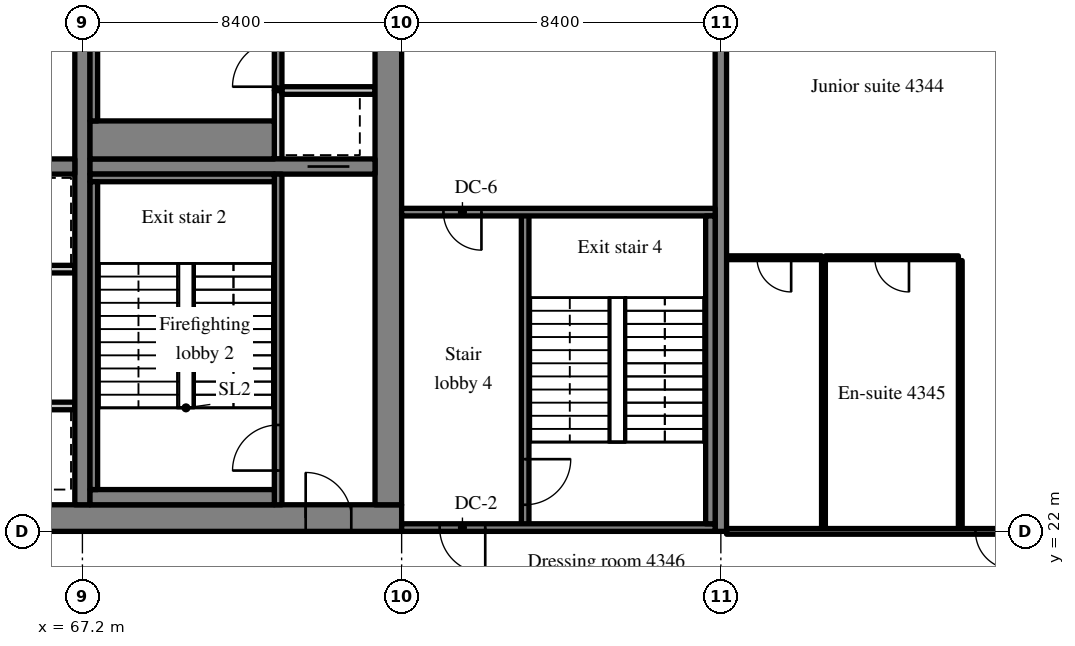
"""IFC4 building model, lengths in metres.
Left out: names, types, materials, properties, quantities, classifications, styles, units other than length and angle.
Written with IfcOpenShell. Run it as: python <this file> out.ifc"""

import sys

from ifc_helpers import new_model, si_unit, direction, frame, frame_2d, origin, place, context, subcontext, project, spatial, rectangle, extrude, source, transform, mapped, element, fill, save


model = new_model("IFC4")
c1 = context("Model", 3, precision=1e-05, world=origin(), true_north=direction((0.0, 1.0)))
c2 = subcontext(c1, "Body", "Model", "MODEL_VIEW")
j1 = project(units=[si_unit("LENGTHUNIT", "METRE"), si_unit("PLANEANGLEUNIT", "RADIAN")], contexts=[c1])
p1 = place(None, origin())
s1 = spatial("IfcSite", under=j1, at=p1, CompositionType="ELEMENT")
p2 = place(p1, origin())
s2 = spatial("IfcBuilding", under=s1, at=p2, CompositionType="ELEMENT")
p3 = place(p2, frame((0.0, 0.0, 178.2)))
s3 = spatial("IfcBuildingStorey", under=s2, at=p3, CompositionType="ELEMENT", Elevation=178.2)
m1 = source(origin(), c2, "Body", "SweptSolid", [
    extrude(rectangle(XDim=50.4, YDim=0.7, at=frame_2d((25.2, 0.0))), origin(), (0.0, 0.0, 1.0), 3.52),
])
p4 = place(p3, frame((25.2, 22.35, 0.0), z_axis=(0.0, 0.0, 1.0), x_axis=(1.0, 0.0, 0.0)))
e1 = element("IfcWall", 1, at=p4, inside=s3, PredefinedType="SHEAR", context=c2, shape_type="MappedRepresentation", body=[
    mapped(m1, transform((0.0, 0.0, 0.0), scale=1.0)),
])
m2 = source(origin(), c2, "Body", "SweptSolid", [
    extrude(rectangle(XDim=1.8, YDim=2.1, at=frame_2d((0.9, 1.05))), frame((0.0, 0.36, 0.0), z_axis=(0.0, -1.0, 0.0), x_axis=(1.0, 0.0, 0.0)), (0.0, 0.0, 1.0), 0.72),
])
p5 = place(p4, frame((15.9, 0.0, 0.0)))
e2 = element("IfcOpeningElement", 2, at=p5, cuts=e1, PredefinedType="OPENING", context=c2, shape_type="MappedRepresentation", body=[
    mapped(m2, transform((0.0, 0.0, 0.0), scale=1.0)),
])
m3 = source(origin(), c2, "Body", "SweptSolid", [
    extrude(rectangle(XDim=0.9, YDim=2.1, at=frame_2d((0.45, 1.05))), frame((0.0, 0.36, 0.0), z_axis=(0.0, -1.0, 0.0), x_axis=(1.0, 0.0, 0.0)), (0.0, 0.0, 1.0), 0.72),
])
p6 = place(p4, frame((11.2, 0.0, 0.0)))
e3 = element("IfcOpeningElement", 3, at=p6, cuts=e1, PredefinedType="OPENING", context=c2, shape_type="MappedRepresentation", body=[
    mapped(m3, transform((0.0, 0.0, 0.0), scale=1.0)),
])
p7 = place(p4, frame((21.5, 0.0, 0.0)))
e4 = element("IfcOpeningElement", 4, at=p7, cuts=e1, PredefinedType="OPENING", context=c2, shape_type="MappedRepresentation", body=[
    mapped(m3, transform((0.0, 0.0, 0.0), scale=1.0)),
])
p8 = place(p4, frame((32.7, 0.0, 0.0)))
e5 = element("IfcOpeningElement", 5, at=p8, cuts=e1, PredefinedType="OPENING", context=c2, shape_type="MappedRepresentation", body=[
    mapped(m2, transform((0.0, 0.0, 0.0), scale=1.0)),
])
m4 = source(origin(), c2, "Body", "SweptSolid", [
    extrude(rectangle(XDim=1.2, YDim=2.1, at=frame_2d((0.6, 1.05))), frame((0.0, 0.36, 0.0), z_axis=(0.0, -1.0, 0.0), x_axis=(1.0, 0.0, 0.0)), (0.0, 0.0, 1.0), 0.72),
])
p9 = place(p4, frame((6.475, 0.0, 0.0)))
e6 = element("IfcOpeningElement", 6, at=p9, cuts=e1, PredefinedType="OPENING", context=c2, shape_type="MappedRepresentation", body=[
    mapped(m4, transform((0.0, 0.0, 0.0), scale=1.0)),
])
p10 = place(p4, frame((47.875, 0.0, 0.0)))
e7 = element("IfcOpeningElement", 7, at=p10, cuts=e1, PredefinedType="OPENING", context=c2, shape_type="MappedRepresentation", body=[
    mapped(m4, transform((0.0, 0.0, 0.0), scale=1.0)),
])
m5 = source(origin(), c2, "Body", "SweptSolid", [
    extrude(rectangle(XDim=18.6, YDim=0.7, at=frame_2d((9.3, 0.0))), origin(), (0.0, 0.0, 1.0), 3.52),
])
p11 = place(p3, frame((75.25, 22.7, 0.0), z_axis=(0.0, 0.0, 1.0), x_axis=(0.0, 1.0, 0.0)))
e8 = element("IfcWall", 8, at=p11, inside=s3, PredefinedType="SHEAR", context=c2, shape_type="MappedRepresentation", body=[
    mapped(m5, transform((0.0, 0.0, 0.0), scale=1.0)),
])
p12 = place(p11, frame((12.7, 0.0, 0.0)))
e9 = element("IfcOpeningElement", 9, at=p12, cuts=e8, PredefinedType="OPENING", context=c2, shape_type="MappedRepresentation", body=[
    mapped(m4, transform((0.0, 0.0, 0.0), scale=1.0)),
])
m6 = source(origin(), c2, "Body", "SweptSolid", [
    extrude(rectangle(XDim=18.6, YDim=0.4, at=frame_2d((9.3, 0.0))), origin(), (0.0, 0.0, 1.0), 3.52),
])
p13 = place(p3, frame((67.2, 22.7, 0.0), z_axis=(0.0, 0.0, 1.0), x_axis=(0.0, 1.0, 0.0)))
e10 = element("IfcWall", 10, at=p13, inside=s3, PredefinedType="SHEAR", context=c2, shape_type="MappedRepresentation", body=[
    mapped(m6, transform((0.0, 0.0, 0.0), scale=1.0)),
])
m7 = source(origin(), c2, "Body", "SweptSolid", [
    extrude(rectangle(XDim=16.4, YDim=0.4, at=frame_2d((8.2, 0.0))), origin(), (0.0, 0.0, 1.0), 3.52),
])
p14 = place(p3, frame((50.6, 31.6, 0.0), z_axis=(0.0, 0.0, 1.0), x_axis=(1.0, 0.0, 0.0)))
e11 = element("IfcWall", 11, at=p14, inside=s3, PredefinedType="SHEAR", context=c2, shape_type="MappedRepresentation", body=[
    mapped(m7, transform((0.0, 0.0, 0.0), scale=1.0)),
])
m8 = source(origin(), c2, "Body", "SweptSolid", [
    extrude(rectangle(XDim=1.0, YDim=2.1, at=frame_2d((0.5, 1.05))), frame((0.0, 0.21, 0.0), z_axis=(0.0, -1.0, 0.0), x_axis=(1.0, 0.0, 0.0)), (0.0, 0.0, 1.0), 0.42),
])
p15 = place(p14, frame((0.6, 0.0, 0.0)))
e12 = element("IfcOpeningElement", 12, at=p15, cuts=e11, PredefinedType="OPENING", context=c2, shape_type="MappedRepresentation", body=[
    mapped(m8, transform((0.0, 0.0, 0.0), scale=1.0)),
])
m9 = source(origin(), c2, "Body", "SweptSolid", [
    extrude(rectangle(XDim=7.5, YDim=0.4, at=frame_2d((3.75, 0.0))), origin(), (0.0, 0.0, 1.0), 3.52),
])
p16 = place(p3, frame((67.4, 31.6, 0.0), z_axis=(0.0, 0.0, 1.0), x_axis=(1.0, 0.0, 0.0)))
e13 = element("IfcWall", 13, at=p16, inside=s3, PredefinedType="SHEAR", context=c2, shape_type="MappedRepresentation", body=[
    mapped(m9, transform((0.0, 0.0, 0.0), scale=1.0)),
])
m10 = source(origin(), c2, "Body", "SweptSolid", [
    extrude(rectangle(XDim=1.1, YDim=2.1, at=frame_2d((0.55, 1.05))), frame((0.0, 0.21, 0.0), z_axis=(0.0, -1.0, 0.0), x_axis=(1.0, 0.0, 0.0)), (0.0, 0.0, 1.0), 0.42),
])
p17 = place(p16, frame((5.725, 0.0, 0.0)))
e14 = element("IfcOpeningElement", 14, at=p17, cuts=e13, PredefinedType="OPENING", context=c2, shape_type="MappedRepresentation", body=[
    mapped(m10, transform((0.0, 0.0, 0.0), scale=1.0)),
])
m11 = source(origin(), c2, "Body", "SweptSolid", [
    extrude(rectangle(XDim=20.0, YDim=0.3, at=frame_2d((10.0, 0.0))), origin(), (0.0, 0.0, 1.0), 3.52),
])
p18 = place(p3, frame((84.0, 22.0, 0.0), z_axis=(0.0, 0.0, 1.0), x_axis=(0.0, 1.0, 0.0)))
e15 = element("IfcWall", 15, at=p18, inside=s3, PredefinedType="SHEAR", context=c2, shape_type="MappedRepresentation", body=[
    mapped(m11, transform((0.0, 0.0, 0.0), scale=1.0)),
])
m12 = source(origin(), c2, "Body", "SweptSolid", [
    extrude(rectangle(XDim=6.1, YDim=0.2, at=frame_2d((3.05, 0.0))), origin(), (0.0, 0.0, 1.0), 3.52),
])
p19 = place(p3, frame((67.0, 25.3, 0.0), z_axis=(0.0, 0.0, 1.0), x_axis=(-1.0, 0.0, 0.0)))
e16 = element("IfcWall", 16, at=p19, inside=s3, PredefinedType="SOLIDWALL", context=c2, shape_type="MappedRepresentation", body=[
    mapped(m12, transform((0.0, 0.0, 0.0), scale=1.0)),
])
m13 = source(origin(), c2, "Body", "SweptSolid", [
    extrude(rectangle(XDim=1.1, YDim=2.1, at=frame_2d((0.55, 1.05))), frame((0.0, 0.11, 0.0), z_axis=(0.0, -1.0, 0.0), x_axis=(1.0, 0.0, 0.0)), (0.0, 0.0, 1.0), 0.22),
])
p20 = place(p19, frame((1.05, 0.0, 0.0)))
e17 = element("IfcOpeningElement", 17, at=p20, cuts=e16, PredefinedType="OPENING", context=c2, shape_type="MappedRepresentation", body=[
    mapped(m13, transform((0.0, 0.0, 0.0), scale=1.0)),
])
p21 = place(p19, frame((4.05, 0.0, 0.0)))
e18 = element("IfcOpeningElement", 18, at=p21, cuts=e16, PredefinedType="OPENING", context=c2, shape_type="MappedRepresentation", body=[
    mapped(m13, transform((0.0, 0.0, 0.0), scale=1.0)),
])
m14 = source(origin(), c2, "Body", "SweptSolid", [
    extrude(rectangle(XDim=12.1, YDim=0.2, at=frame_2d((6.05, 0.0))), origin(), (0.0, 0.0, 1.0), 3.52),
])
p22 = place(p3, frame((67.0, 28.9, 0.0), z_axis=(0.0, 0.0, 1.0), x_axis=(-1.0, 0.0, 0.0)))
e19 = element("IfcWall", 19, at=p22, inside=s3, PredefinedType="SOLIDWALL", context=c2, shape_type="MappedRepresentation", body=[
    mapped(m14, transform((0.0, 0.0, 0.0), scale=1.0)),
])
p23 = place(p22, frame((1.05, 0.0, 0.0)))
e20 = element("IfcOpeningElement", 20, at=p23, cuts=e19, PredefinedType="OPENING", context=c2, shape_type="MappedRepresentation", body=[
    mapped(m13, transform((0.0, 0.0, 0.0), scale=1.0)),
])
p24 = place(p22, frame((4.05, 0.0, 0.0)))
e21 = element("IfcOpeningElement", 21, at=p24, cuts=e19, PredefinedType="OPENING", context=c2, shape_type="MappedRepresentation", body=[
    mapped(m13, transform((0.0, 0.0, 0.0), scale=1.0)),
])
m15 = source(origin(), c2, "Body", "SweptSolid", [
    extrude(rectangle(XDim=8.7, YDim=0.2, at=frame_2d((4.35, 0.0))), origin(), (0.0, 0.0, 1.0), 3.52),
])
p25 = place(p3, frame((72.35, 22.7, 0.0), z_axis=(0.0, 0.0, 1.0), x_axis=(0.0, 1.0, 0.0)))
e22 = element("IfcWall", 22, at=p25, inside=s3, PredefinedType="SOLIDWALL", context=c2, shape_type="MappedRepresentation", body=[
    mapped(m15, transform((0.0, 0.0, 0.0), scale=1.0)),
])
m16 = source(origin(), c2, "Body", "SweptSolid", [
    extrude(rectangle(XDim=1.2, YDim=2.1, at=frame_2d((0.6, 1.05))), frame((0.0, 0.11, 0.0), z_axis=(0.0, -1.0, 0.0), x_axis=(1.0, 0.0, 0.0)), (0.0, 0.0, 1.0), 0.22),
])
p26 = place(p25, frame((0.9, 0.0, 0.0)))
e23 = element("IfcOpeningElement", 23, at=p26, cuts=e22, PredefinedType="OPENING", context=c2, shape_type="MappedRepresentation", body=[
    mapped(m16, transform((0.0, 0.0, 0.0), scale=1.0)),
])
m17 = source(origin(), c2, "Body", "SweptSolid", [
    extrude(rectangle(XDim=1.8, YDim=0.2, at=frame_2d((0.9, 0.0))), origin(), (0.0, 0.0, 1.0), 3.52),
])
p27 = place(p3, frame((72.35, 31.8, 0.0), z_axis=(0.0, 0.0, 1.0), x_axis=(0.0, 1.0, 0.0)))
e24 = element("IfcWall", 24, at=p27, inside=s3, PredefinedType="SOLIDWALL", context=c2, shape_type="MappedRepresentation", body=[
    mapped(m17, transform((0.0, 0.0, 0.0), scale=1.0)),
])
m18 = source(origin(), c2, "Body", "SweptSolid", [
    extrude(rectangle(XDim=2.45, YDim=0.2, at=frame_2d((1.225, 0.0))), origin(), (0.0, 0.0, 1.0), 3.52),
])
p28 = place(p3, frame((72.45, 33.6, 0.0), z_axis=(0.0, 0.0, 1.0), x_axis=(1.0, 0.0, 0.0)))
e25 = element("IfcWall", 25, at=p28, inside=s3, PredefinedType="SOLIDWALL", context=c2, shape_type="MappedRepresentation", body=[
    mapped(m18, transform((0.0, 0.0, 0.0), scale=1.0)),
])
m19 = source(origin(), c2, "Body", "SweptSolid", [
    extrude(rectangle(XDim=7.7, YDim=0.2, at=frame_2d((3.85, 0.0))), origin(), (0.0, 0.0, 1.0), 3.52),
])
p29 = place(p3, frame((72.35, 33.6, 0.0), z_axis=(0.0, 0.0, 1.0), x_axis=(0.0, 1.0, 0.0)))
e26 = element("IfcWall", 26, at=p29, inside=s3, PredefinedType="SOLIDWALL", context=c2, shape_type="MappedRepresentation", body=[
    mapped(m19, transform((0.0, 0.0, 0.0), scale=1.0)),
])
p30 = place(p29, frame((0.1, 0.0, 0.0)))
e27 = element("IfcOpeningElement", 27, at=p30, cuts=e26, PredefinedType="OPENING", context=c2, shape_type="MappedRepresentation", body=[
    mapped(m16, transform((0.0, 0.0, 0.0), scale=1.0)),
])
m20 = source(origin(), c2, "Body", "SweptSolid", [
    extrude(rectangle(XDim=8.3, YDim=0.2, at=frame_2d((4.15, 0.0))), origin(), (0.0, 0.0, 1.0), 3.52),
])
p31 = place(p3, frame((78.85, 22.1, 0.0), z_axis=(0.0, 0.0, 1.0), x_axis=(0.0, 1.0, 0.0)))
e28 = element("IfcWall", 28, at=p31, inside=s3, PredefinedType="SOLIDWALL", context=c2, shape_type="MappedRepresentation", body=[
    mapped(m20, transform((0.0, 0.0, 0.0), scale=1.0)),
])
p32 = place(p31, frame((0.6, 0.0, 0.0)))
e29 = element("IfcOpeningElement", 29, at=p32, cuts=e28, PredefinedType="OPENING", context=c2, shape_type="MappedRepresentation", body=[
    mapped(m16, transform((0.0, 0.0, 0.0), scale=1.0)),
])
m21 = source(origin(), c2, "Body", "SweptSolid", [
    extrude(rectangle(XDim=8.25, YDim=0.2, at=frame_2d((4.125, 0.0))), origin(), (0.0, 0.0, 1.0), 3.52),
])
p33 = place(p3, frame((83.85, 22.1, 0.0), z_axis=(0.0, 0.0, 1.0), x_axis=(-1.0, 0.0, 0.0)))
e30 = element("IfcWall", 30, at=p33, inside=s3, PredefinedType="SOLIDWALL", context=c2, shape_type="MappedRepresentation", body=[
    mapped(m21, transform((0.0, 0.0, 0.0), scale=1.0)),
])
p34 = place(p33, frame((6.05, 0.0, 0.0)))
e31 = element("IfcOpeningElement", 31, at=p34, cuts=e30, PredefinedType="OPENING", context=c2, shape_type="MappedRepresentation", body=[
    mapped(m16, transform((0.0, 0.0, 0.0), scale=1.0)),
])
p35 = place(p3, frame((83.85, 30.4, 0.0), z_axis=(0.0, 0.0, 1.0), x_axis=(-1.0, 0.0, 0.0)))
e32 = element("IfcWall", 32, at=p35, inside=s3, PredefinedType="SOLIDWALL", context=c2, shape_type="MappedRepresentation", body=[
    mapped(m21, transform((0.0, 0.0, 0.0), scale=1.0)),
])
m22 = source(origin(), c2, "Body", "SweptSolid", [
    extrude(rectangle(XDim=1.0, YDim=2.1, at=frame_2d((0.5, 1.05))), frame((0.0, 0.11, 0.0), z_axis=(0.0, -1.0, 0.0), x_axis=(1.0, 0.0, 0.0)), (0.0, 0.0, 1.0), 0.22),
])
p36 = place(p35, frame((6.15, 0.0, 0.0)))
e33 = element("IfcOpeningElement", 33, at=p36, cuts=e32, PredefinedType="OPENING", context=c2, shape_type="MappedRepresentation", body=[
    mapped(m22, transform((0.0, 0.0, 0.0), scale=1.0)),
])
m23 = source(origin(), c2, "Body", "SweptSolid", [
    extrude(rectangle(XDim=4.85, YDim=0.4, at=frame_2d((2.425, 0.0))), origin(), (0.0, 0.0, 1.0), 3.52),
])
p37 = place(p3, frame((67.4, 22.9, 0.0), z_axis=(0.0, 0.0, 1.0), x_axis=(1.0, 0.0, 0.0)))
e34 = element("IfcWall", 34, at=p37, inside=s3, PredefinedType="SOLIDWALL", context=c2, shape_type="MappedRepresentation", body=[
    mapped(m23, transform((0.0, 0.0, 0.0), scale=1.0)),
])
m24 = source(origin(), c2, "Body", "SweptSolid", [
    extrude(rectangle(XDim=4.85, YDim=0.2, at=frame_2d((2.425, 0.0))), origin(), (0.0, 0.0, 1.0), 3.52),
])
p38 = place(p3, frame((67.4, 31.3, 0.0), z_axis=(0.0, 0.0, 1.0), x_axis=(1.0, 0.0, 0.0)))
e35 = element("IfcWall", 35, at=p38, inside=s3, PredefinedType="SOLIDWALL", context=c2, shape_type="MappedRepresentation", body=[
    mapped(m24, transform((0.0, 0.0, 0.0), scale=1.0)),
])
m25 = source(origin(), c2, "Body", "SweptSolid", [
    extrude(rectangle(XDim=8.1, YDim=0.2, at=frame_2d((4.05, 0.0))), origin(), (0.0, 0.0, 1.0), 3.52),
])
p39 = place(p3, frame((67.5, 23.1, 0.0), z_axis=(0.0, 0.0, 1.0), x_axis=(0.0, 1.0, 0.0)))
e36 = element("IfcWall", 36, at=p39, inside=s3, PredefinedType="SOLIDWALL", context=c2, shape_type="MappedRepresentation", body=[
    mapped(m25, transform((0.0, 0.0, 0.0), scale=1.0)),
])
m26 = source(origin(), c2, "Body", "SweptSolid", [
    extrude(rectangle(XDim=4.85, YDim=1.0, at=frame_2d((2.425, 0.0))), origin(), (0.0, 0.0, 1.0), 3.52),
])
p40 = place(p3, frame((67.4, 32.3, 0.0), z_axis=(0.0, 0.0, 1.0), x_axis=(1.0, 0.0, 0.0)))
e37 = element("IfcWall", 37, at=p40, inside=s3, PredefinedType="SOLIDWALL", context=c2, shape_type="MappedRepresentation", body=[
    mapped(m26, transform((0.0, 0.0, 0.0), scale=1.0)),
])
p41 = place(p3, frame((67.5, 32.8, 0.0), z_axis=(0.0, 0.0, 1.0), x_axis=(0.0, 1.0, 0.0)))
e38 = element("IfcWall", 38, at=p41, inside=s3, PredefinedType="SOLIDWALL", context=c2, shape_type="MappedRepresentation", body=[
    mapped(m25, transform((0.0, 0.0, 0.0), scale=1.0)),
])
m27 = source(origin(), c2, "Body", "SweptSolid", [
    extrude(rectangle(XDim=8.1, YDim=0.25, at=frame_2d((4.05, 0.0))), origin(), (0.0, 0.0, 1.0), 3.52),
])
p42 = place(p3, frame((83.725, 22.2, 0.0), z_axis=(0.0, 0.0, 1.0), x_axis=(0.0, 1.0, 0.0)))
e39 = element("IfcWall", 39, at=p42, inside=s3, PredefinedType="SOLIDWALL", context=c2, shape_type="MappedRepresentation", body=[
    mapped(m27, transform((0.0, 0.0, 0.0), scale=1.0)),
])
m28 = source(origin(), c2, "Body", "SweptSolid", [
    extrude(rectangle(XDim=7.05, YDim=0.1, at=frame_2d((3.525, 0.0))), origin(), (0.0, 0.0, 1.0), 3.52),
])
for number, where, z_axis, x_axis in (
    (40, (90.3, 22.075, 0.0), (0.0, 0.0, 1.0), (0.0, 1.0, 0.0)),
    (41, (86.7, 22.075, 0.0), (0.0, 0.0, 1.0), (0.0, 1.0, 0.0)),
):
    element("IfcWall", number, at=place(p3, frame(where, z_axis=z_axis, x_axis=x_axis)), inside=s3, PredefinedType="PARTITIONING", context=c2, shape_type="MappedRepresentation", body=[
        mapped(m28, transform((0.0, 0.0, 0.0), scale=1.0)),
    ])
m29 = source(origin(), c2, "Body", "SweptSolid", [
    extrude(rectangle(XDim=3.5, YDim=0.1, at=frame_2d((1.75, 0.0))), origin(), (0.0, 0.0, 1.0), 3.52),
])
p43 = place(p3, frame((86.75, 29.2, 0.0), z_axis=(0.0, 0.0, 1.0), x_axis=(1.0, 0.0, 0.0)))
e42 = element("IfcWall", 42, at=p43, inside=s3, PredefinedType="PARTITIONING", context=c2, shape_type="MappedRepresentation", body=[
    mapped(m29, transform((0.0, 0.0, 0.0), scale=1.0)),
])
m30 = source(origin(), c2, "Body", "SweptSolid", [
    extrude(rectangle(XDim=0.9, YDim=2.1, at=frame_2d((0.45, 1.05))), frame((0.0, 0.06, 0.0), z_axis=(0.0, -1.0, 0.0), x_axis=(1.0, 0.0, 0.0)), (0.0, 0.0, 1.0), 0.12),
])
p44 = place(p43, frame((1.3, 0.0, 0.0)))
e43 = element("IfcOpeningElement", 43, at=p44, cuts=e42, PredefinedType="OPENING", context=c2, shape_type="MappedRepresentation", body=[
    mapped(m30, transform((0.0, 0.0, 0.0), scale=1.0)),
])
m31 = source(origin(), c2, "Body", "SweptSolid", [
    extrude(rectangle(XDim=2.5, YDim=0.1, at=frame_2d((1.25, 0.0))), origin(), (0.0, 0.0, 1.0), 3.52),
])
p45 = place(p3, frame((84.15, 29.2, 0.0), z_axis=(0.0, 0.0, 1.0), x_axis=(1.0, 0.0, 0.0)))
e44 = element("IfcWall", 44, at=p45, inside=s3, PredefinedType="PARTITIONING", context=c2, shape_type="MappedRepresentation", body=[
    mapped(m31, transform((0.0, 0.0, 0.0), scale=1.0)),
])
p46 = place(p45, frame((0.8, 0.0, 0.0)))
e45 = element("IfcOpeningElement", 45, at=p46, cuts=e44, PredefinedType="OPENING", context=c2, shape_type="MappedRepresentation", body=[
    mapped(m30, transform((0.0, 0.0, 0.0), scale=1.0)),
])
m32 = source(origin(), c2, "Body", "SweptSolid", [
    extrude(rectangle(XDim=7.95, YDim=0.15, at=frame_2d((3.975, 0.0))), origin(), (0.0, 0.0, 1.0), 2.82),
])
p47 = place(p3, frame((84.15, 22.0, 0.0), z_axis=(0.0, 0.0, 1.0), x_axis=(1.0, 0.0, 0.0)))
e46 = element("IfcWall", 46, at=p47, inside=s3, PredefinedType="PARTITIONING", context=c2, shape_type="MappedRepresentation", body=[
    mapped(m32, transform((0.0, 0.0, 0.0), scale=1.0)),
])
m33 = source(origin(), c2, "Body", "SweptSolid", [
    extrude(rectangle(XDim=1.0, YDim=2.1, at=frame_2d((0.5, 1.05))), frame((0.0, 0.085, 0.0), z_axis=(0.0, -1.0, 0.0), x_axis=(1.0, 0.0, 0.0)), (0.0, 0.0, 1.0), 0.17),
])
p48 = place(p47, frame((6.55, 0.0, 0.0)))
e47 = element("IfcOpeningElement", 47, at=p48, cuts=e46, PredefinedType="OPENING", context=c2, shape_type="MappedRepresentation", body=[
    mapped(m33, transform((0.0, 0.0, 0.0), scale=1.0)),
])
m34 = source(origin(), c2, "Body", "SweptSolid", [
    extrude(rectangle(XDim=1.2, YDim=2.1, at=frame_2d((0.6, 1.05))), frame((0.0, 0.025, 0.0), z_axis=(0.0, -1.0, 0.0), x_axis=(1.0, 0.0, 0.0)), (0.0, 0.0, 1.0), 0.05),
])
p49 = place(p26, origin())
e48 = element("IfcDoor", 48, at=p49, inside=s3, OperationType="SINGLE_SWING_LEFT", PredefinedType="DOOR", context=c2, shape_type="MappedRepresentation", body=[
    mapped(m34, transform((0.0, 0.0, 0.0), scale=1.0)),
])
fill(e23, e48)
m35 = source(origin(), c2, "Body", "SweptSolid", [
    extrude(rectangle(XDim=1.2, YDim=2.1, at=frame_2d((0.6, 1.05))), frame((0.0, 0.275, 0.0), z_axis=(0.0, -1.0, 0.0), x_axis=(1.0, 0.0, 0.0)), (0.0, 0.0, 1.0), 0.05),
])
p50 = place(p10, origin())
e49 = element("IfcDoor", 49, at=p50, inside=s3, OperationType="SINGLE_SWING_LEFT", PredefinedType="DOOR", context=c2, shape_type="MappedRepresentation", body=[
    mapped(m35, transform((0.0, 0.0, 0.0), scale=1.0)),
])
fill(e7, e49)
m36 = source(origin(), c2, "Body", "SweptSolid", [
    extrude(rectangle(XDim=1.1, YDim=2.1, at=frame_2d((0.55, 1.05))), frame((0.0, 0.025, 0.0), z_axis=(0.0, -1.0, 0.0), x_axis=(1.0, 0.0, 0.0)), (0.0, 0.0, 1.0), 0.05),
])
p51 = place(p17, origin())
e50 = element("IfcDoor", 50, at=p51, inside=s3, OperationType="SLIDING_TO_LEFT", PredefinedType="DOOR", context=c2, shape_type="MappedRepresentation", body=[
    mapped(m36, transform((0.0, 0.0, 0.0), scale=1.0)),
])
fill(e14, e50)
p52 = place(p30, origin())
e51 = element("IfcDoor", 51, at=p52, inside=s3, OperationType="SINGLE_SWING_LEFT", PredefinedType="DOOR", context=c2, shape_type="MappedRepresentation", body=[
    mapped(m34, transform((0.0, 0.0, 0.0), scale=1.0)),
])
fill(e27, e51)
p53 = place(p32, origin())
e52 = element("IfcDoor", 52, at=p53, inside=s3, OperationType="SINGLE_SWING_RIGHT", PredefinedType="DOOR", context=c2, shape_type="MappedRepresentation", body=[
    mapped(m34, transform((0.0, 0.0, 0.0), scale=1.0)),
])
fill(e29, e52)
p54 = place(p34, origin())
e53 = element("IfcDoor", 53, at=p54, inside=s3, OperationType="SINGLE_SWING_LEFT", PredefinedType="DOOR", context=c2, shape_type="MappedRepresentation", body=[
    mapped(m34, transform((0.0, 0.0, 0.0), scale=1.0)),
])
fill(e31, e53)
m37 = source(origin(), c2, "Body", "SweptSolid", [
    extrude(rectangle(XDim=1.0, YDim=2.1, at=frame_2d((0.5, 1.05))), frame((0.0, 0.025, 0.0), z_axis=(0.0, -1.0, 0.0), x_axis=(1.0, 0.0, 0.0)), (0.0, 0.0, 1.0), 0.05),
])
p55 = place(p36, origin())
e54 = element("IfcDoor", 54, at=p55, inside=s3, OperationType="SINGLE_SWING_LEFT", PredefinedType="DOOR", context=c2, shape_type="MappedRepresentation", body=[
    mapped(m37, transform((0.0, 0.0, 0.0), scale=1.0)),
])
fill(e33, e54)
m38 = source(origin(), c2, "Body", "SweptSolid", [
    extrude(rectangle(XDim=0.9, YDim=2.1, at=frame_2d((0.45, 1.05))), frame((0.0, 0.025, 0.0), z_axis=(0.0, -1.0, 0.0), x_axis=(1.0, 0.0, 0.0)), (0.0, 0.0, 1.0), 0.05),
])
p56 = place(p44, origin())
e55 = element("IfcDoor", 55, at=p56, inside=s3, OperationType="SINGLE_SWING_RIGHT", PredefinedType="DOOR", context=c2, shape_type="MappedRepresentation", body=[
    mapped(m38, transform((0.0, 0.0, 0.0), scale=1.0)),
])
fill(e43, e55)
p57 = place(p46, origin())
e56 = element("IfcDoor", 56, at=p57, inside=s3, OperationType="SINGLE_SWING_RIGHT", PredefinedType="DOOR", context=c2, shape_type="MappedRepresentation", body=[
    mapped(m38, transform((0.0, 0.0, 0.0), scale=1.0)),
])
fill(e45, e56)
p58 = place(p48, origin())
e57 = element("IfcDoor", 57, at=p58, inside=s3, OperationType="SINGLE_SWING_RIGHT", PredefinedType="DOOR", context=c2, shape_type="MappedRepresentation", body=[
    mapped(m37, transform((0.0, 0.0, 0.0), scale=1.0)),
])
fill(e47, e57)
save(model, sys.argv[1])
